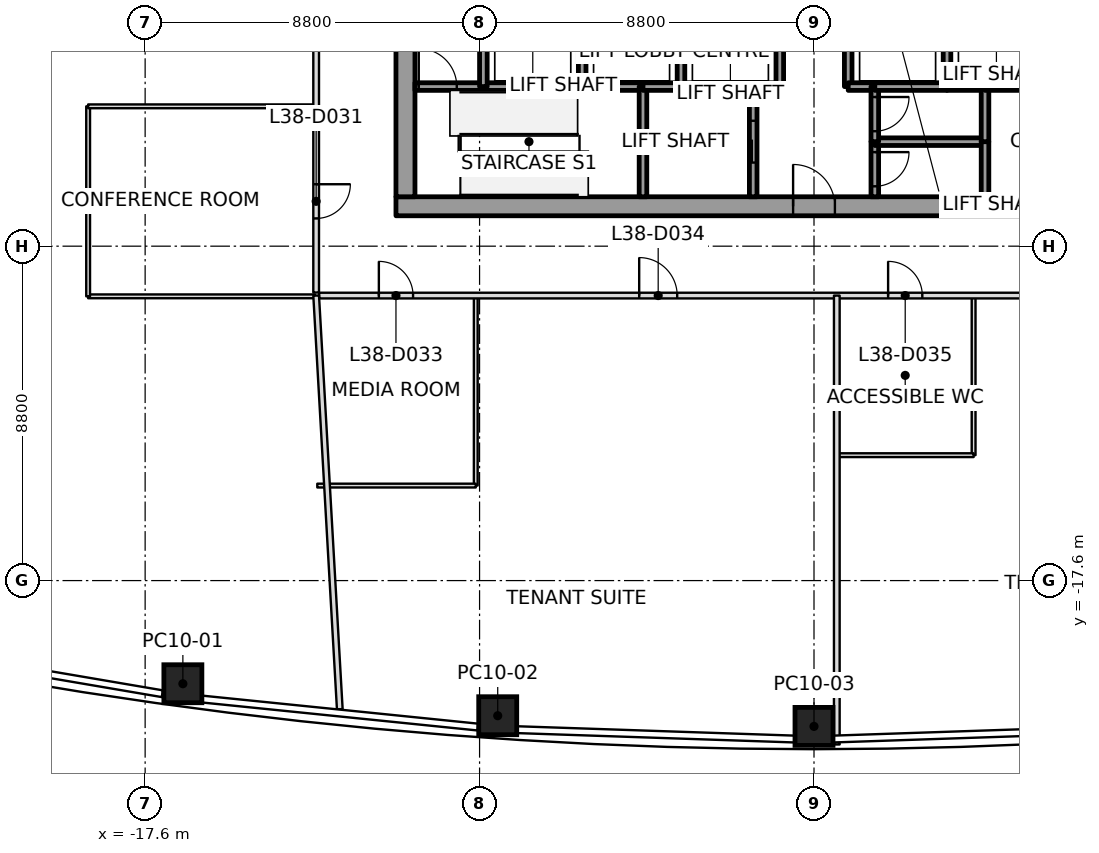
"""IFC4 building model, lengths in metres.
Left out: names, types, materials, properties, quantities, classifications, styles, units other than length and angle.
Written with IfcOpenShell. Run it as: python <this file> out.ifc"""

import sys

from ifc_helpers import new_model, si_unit, direction, frame, frame_2d, origin, origin_2d, place, context, subcontext, project, spatial, rectangle, extrude, element, fill, save


model = new_model("IFC4")
c1 = context("Model", 3, precision=1e-05, world=origin(), true_north=direction((0.0, 1.0)))
c2 = subcontext(c1, "Body", "Model", "MODEL_VIEW")
j1 = project(units=[si_unit("LENGTHUNIT", "METRE"), si_unit("PLANEANGLEUNIT", "RADIAN")], contexts=[c1])
p1 = place(None, origin())
s1 = spatial("IfcSite", under=j1, at=p1, CompositionType="ELEMENT")
p2 = place(p1, origin())
s2 = spatial("IfcBuilding", under=s1, at=p2, CompositionType="ELEMENT")
p3 = place(p2, frame((0.0, 0.0, 173.8)))
s3 = spatial("IfcBuildingStorey", under=s2, at=p3, CompositionType="ELEMENT", Elevation=173.8)
p4 = place(p3, frame((-16.607, -20.315, 0.0), z_axis=(0.017635445209, 0.010495835903, 0.999789392073), x_axis=(-0.990749179491, 0.134751980864, 0.01606135084)))
e1 = element("IfcColumn", 1, at=p4, inside=s3, PredefinedType="COLUMN", context=c2, shape_type="SweptSolid", body=[
    extrude(rectangle(XDim=1.0, YDim=1.0, at=origin_2d()), origin(), (0.0, 0.0, 1.0), 4.001),
])
p5 = place(p3, frame((-8.323, -21.156, 0.0), z_axis=(0.008849193104, 0.011229320904, 0.999897791843), x_axis=(-0.997684103914, 0.067537291309, 0.00807112631)))
e2 = element("IfcColumn", 2, at=p5, inside=s3, PredefinedType="COLUMN", context=c2, shape_type="SweptSolid", body=[
    extrude(rectangle(XDim=1.0, YDim=1.0, at=origin_2d()), origin(), (0.0, 0.0, 1.0), 4.0),
])
p6 = place(p3, frame((0.0, -21.437, 0.0), z_axis=(0.0, 0.01141283087, 0.999934871525), x_axis=(1.0, 0.0, 0.0)))
e3 = element("IfcColumn", 3, at=p6, inside=s3, PredefinedType="COLUMN", context=c2, shape_type="SweptSolid", body=[
    extrude(rectangle(XDim=1.0, YDim=1.0, at=origin_2d()), origin(), (0.0, 0.0, 1.0), 4.0),
])
p7 = place(p3, frame((-11.0, -7.75, 0.0), z_axis=(0.0, 0.0, 1.0), x_axis=(1.0, 0.0, 0.0)))
e4 = element("IfcWall", 4, at=p7, inside=s3, PredefinedType="SHEAR", context=c2, shape_type="SweptSolid", body=[
    extrude(rectangle(XDim=22.0, YDim=0.5, at=frame_2d((11.0, 0.0))), origin(), (0.0, 0.0, 1.0), 4.0),
])
p8 = place(p7, frame((10.45, 0.0, 0.0)))
e5 = element("IfcOpeningElement", 5, at=p8, cuts=e4, PredefinedType="OPENING", context=c2, shape_type="SweptSolid", body=[
    extrude(rectangle(XDim=1.1, YDim=2.1, at=frame_2d((0.55, 1.05))), frame((0.0, 0.25, 0.0), z_axis=(0.0, -1.0, 0.0), x_axis=(1.0, 0.0, 0.0)), (0.0, 0.0, 1.0), 0.5),
])
p9 = place(p3, frame((-10.75, -7.5, 0.0), z_axis=(0.0, 0.0, 1.0), x_axis=(0.0, 1.0, 0.0)))
e6 = element("IfcWall", 6, at=p9, inside=s3, PredefinedType="SHEAR", context=c2, shape_type="SweptSolid", body=[
    extrude(rectangle(XDim=15.0, YDim=0.5, at=frame_2d((7.5, 0.0))), origin(), (0.0, 0.0, 1.0), 4.0),
])
p10 = place(p9, frame((6.6, 0.0, 0.0)))
e7 = element("IfcOpeningElement", 7, at=p10, cuts=e6, PredefinedType="OPENING", context=c2, shape_type="SweptSolid", body=[
    extrude(rectangle(XDim=1.8, YDim=2.1, at=frame_2d((0.9, 1.05))), frame((0.0, 0.25, 0.0), z_axis=(0.0, -1.0, 0.0), x_axis=(1.0, 0.0, 0.0)), (0.0, 0.0, 1.0), 0.5),
])
p11 = place(p3, frame((-10.5, -4.6, 0.0), z_axis=(0.0, 0.0, 1.0), x_axis=(1.0, 0.0, 0.0)))
e8 = element("IfcWall", 8, at=p11, inside=s3, PredefinedType="SOLIDWALL", context=c2, shape_type="SweptSolid", body=[
    extrude(rectangle(XDim=1.8, YDim=0.2, at=frame_2d((0.9, 0.0))), origin(), (0.0, 0.0, 1.0), 3.85),
])
p12 = place(p11, frame((0.1, 0.0, 0.0)))
e9 = element("IfcOpeningElement", 9, at=p12, cuts=e8, PredefinedType="OPENING", context=c2, shape_type="SweptSolid", body=[
    extrude(rectangle(XDim=1.0, YDim=2.1, at=frame_2d((0.5, 1.05))), frame((0.0, 0.1, 0.0), z_axis=(0.0, -1.0, 0.0), x_axis=(1.0, 0.0, 0.0)), (0.0, 0.0, 1.0), 0.2),
])
p13 = place(p3, frame((-8.7, -4.6, 0.0), z_axis=(0.0, 0.0, 1.0), x_axis=(1.0, 0.0, 0.0)))
e10 = element("IfcWall", 10, at=p13, inside=s3, PredefinedType="SOLIDWALL", context=c2, shape_type="SweptSolid", body=[
    extrude(rectangle(XDim=2.6, YDim=0.2, at=frame_2d((1.3, 0.0))), origin(), (0.0, 0.0, 1.0), 3.85),
])
p14 = place(p3, frame((-8.7, -4.6, 0.0), z_axis=(0.0, 0.0, 1.0), x_axis=(0.0, 1.0, 0.0)))
e11 = element("IfcWall", 11, at=p14, inside=s3, PredefinedType="SOLIDWALL", context=c2, shape_type="SweptSolid", body=[
    extrude(rectangle(XDim=2.8, YDim=0.2, at=frame_2d((1.4, 0.0))), origin(), (0.0, 0.0, 1.0), 3.85),
])
p15 = place(p3, frame((-6.1, -4.6, 0.0), z_axis=(0.0, 0.0, 1.0), x_axis=(1.0, 0.0, 0.0)))
e12 = element("IfcWall", 12, at=p15, inside=s3, PredefinedType="SOLIDWALL", context=c2, shape_type="SweptSolid", body=[
    extrude(rectangle(XDim=1.6, YDim=0.2, at=frame_2d((0.8, 0.0))), origin(), (0.0, 0.0, 1.0), 3.85),
])
p16 = place(p3, frame((-6.1, -4.6, 0.0), z_axis=(0.0, 0.0, 1.0), x_axis=(0.0, 1.0, 0.0)))
e13 = element("IfcWall", 13, at=p16, inside=s3, PredefinedType="SOLIDWALL", context=c2, shape_type="SweptSolid", body=[
    extrude(rectangle(XDim=2.8, YDim=0.2, at=frame_2d((1.4, 0.0))), origin(), (0.0, 0.0, 1.0), 3.85),
])
p17 = place(p3, frame((-4.5, -4.6, 0.0), z_axis=(0.0, 0.0, 1.0), x_axis=(0.0, -1.0, 0.0)))
e14 = element("IfcWall", 14, at=p17, inside=s3, PredefinedType="SOLIDWALL", context=c2, shape_type="SweptSolid", body=[
    extrude(rectangle(XDim=2.9, YDim=0.2, at=frame_2d((1.45, 0.0))), origin(), (0.0, 0.0, 1.0), 3.85),
])
p18 = place(p3, frame((-4.5, -4.6, 0.0), z_axis=(0.0, 0.0, 1.0), x_axis=(1.0, 0.0, 0.0)))
e15 = element("IfcWall", 15, at=p18, inside=s3, PredefinedType="SOLIDWALL", context=c2, shape_type="SweptSolid", body=[
    extrude(rectangle(XDim=1.0, YDim=0.2, at=frame_2d((0.5, 0.0))), origin(), (0.0, 0.0, 1.0), 3.85),
])
p19 = place(p3, frame((-3.5, -4.6, 0.0), z_axis=(0.0, 0.0, 1.0), x_axis=(1.0, 0.0, 0.0)))
e16 = element("IfcWall", 16, at=p19, inside=s3, PredefinedType="SOLIDWALL", context=c2, shape_type="SweptSolid", body=[
    extrude(rectangle(XDim=1.9, YDim=0.2, at=frame_2d((0.95, 0.0))), origin(), (0.0, 0.0, 1.0), 3.85),
])
p20 = place(p3, frame((-3.5, -4.6, 0.0), z_axis=(0.0, 0.0, 1.0), x_axis=(0.0, 1.0, 0.0)))
e17 = element("IfcWall", 17, at=p20, inside=s3, PredefinedType="SOLIDWALL", context=c2, shape_type="SweptSolid", body=[
    extrude(rectangle(XDim=2.8, YDim=0.2, at=frame_2d((1.4, 0.0))), origin(), (0.0, 0.0, 1.0), 3.85),
])
p21 = place(p3, frame((-1.6, -7.5, 0.0), z_axis=(0.0, 0.0, 1.0), x_axis=(0.0, 1.0, 0.0)))
e18 = element("IfcWall", 18, at=p21, inside=s3, PredefinedType="SOLIDWALL", context=c2, shape_type="SweptSolid", body=[
    extrude(rectangle(XDim=2.9, YDim=0.2, at=frame_2d((1.45, 0.0))), origin(), (0.0, 0.0, 1.0), 3.85),
])
p22 = place(p21, frame((0.9, 0.0, 0.0)))
e19 = element("IfcOpeningElement", 19, at=p22, cuts=e18, PredefinedType="OPENING", context=c2, shape_type="SweptSolid", body=[
    extrude(rectangle(XDim=1.1, YDim=2.1, at=frame_2d((0.55, 1.05))), frame((0.0, 0.1, 0.0), z_axis=(0.0, -1.0, 0.0), x_axis=(1.0, 0.0, 0.0)), (0.0, 0.0, 1.0), 0.2),
])
p23 = place(p3, frame((-1.6, -4.6, 0.0), z_axis=(0.0, 0.0, 1.0), x_axis=(1.0, 0.0, 0.0)))
e20 = element("IfcWall", 20, at=p23, inside=s3, PredefinedType="SOLIDWALL", context=c2, shape_type="SweptSolid", body=[
    extrude(rectangle(XDim=0.7, YDim=0.2, at=frame_2d((0.35, 0.0))), origin(), (0.0, 0.0, 1.0), 3.85),
])
for number, where, z_axis, x_axis in (
    (21, (-0.9, -4.6, 0.0), (0.0, 0.0, 1.0), (0.0, 1.0, 0.0)),
    (22, (0.9, -1.8, 0.0), (0.0, 0.0, 1.0), (0.0, -1.0, 0.0)),
):
    element("IfcWall", number, at=place(p3, frame(where, z_axis=z_axis, x_axis=x_axis)), inside=s3, PredefinedType="SOLIDWALL", context=c2, shape_type="SweptSolid", body=[
        extrude(rectangle(XDim=2.8, YDim=0.2, at=frame_2d((1.4, 0.0))), origin(), (0.0, 0.0, 1.0), 3.85),
    ])
p24 = place(p3, frame((0.9, -4.6, 0.0), z_axis=(0.0, 0.0, 1.0), x_axis=(1.0, 0.0, 0.0)))
e23 = element("IfcWall", 23, at=p24, inside=s3, PredefinedType="SOLIDWALL", context=c2, shape_type="SweptSolid", body=[
    extrude(rectangle(XDim=0.7, YDim=0.2, at=frame_2d((0.35, 0.0))), origin(), (0.0, 0.0, 1.0), 3.85),
])
p25 = place(p3, frame((1.6, -6.05, 0.0), z_axis=(0.0, 0.0, 1.0), x_axis=(0.0, -1.0, 0.0)))
e24 = element("IfcWall", 24, at=p25, inside=s3, PredefinedType="SOLIDWALL", context=c2, shape_type="SweptSolid", body=[
    extrude(rectangle(XDim=1.45, YDim=0.2, at=frame_2d((0.725, 0.0))), origin(), (0.0, 0.0, 1.0), 3.85),
])
p26 = place(p25, frame((0.275, 0.0, 0.0)))
e25 = element("IfcOpeningElement", 25, at=p26, cuts=e24, PredefinedType="OPENING", context=c2, shape_type="SweptSolid", body=[
    extrude(rectangle(XDim=0.9, YDim=2.1, at=frame_2d((0.45, 1.05))), frame((0.0, 0.1, 0.0), z_axis=(0.0, -1.0, 0.0), x_axis=(1.0, 0.0, 0.0)), (0.0, 0.0, 1.0), 0.2),
])
p27 = place(p3, frame((4.5, -6.05, 0.0), z_axis=(0.0, 0.0, 1.0), x_axis=(-1.0, 0.0, 0.0)))
e26 = element("IfcWall", 26, at=p27, inside=s3, PredefinedType="SOLIDWALL", context=c2, shape_type="SweptSolid", body=[
    extrude(rectangle(XDim=2.9, YDim=0.2, at=frame_2d((1.45, 0.0))), origin(), (0.0, 0.0, 1.0), 3.85),
])
p28 = place(p3, frame((1.6, -4.6, 0.0), z_axis=(0.0, 0.0, 1.0), x_axis=(0.0, -1.0, 0.0)))
e27 = element("IfcWall", 27, at=p28, inside=s3, PredefinedType="SOLIDWALL", context=c2, shape_type="SweptSolid", body=[
    extrude(rectangle(XDim=1.45, YDim=0.2, at=frame_2d((0.725, 0.0))), origin(), (0.0, 0.0, 1.0), 3.85),
])
p29 = place(p28, frame((0.275, 0.0, 0.0)))
e28 = element("IfcOpeningElement", 28, at=p29, cuts=e27, PredefinedType="OPENING", context=c2, shape_type="SweptSolid", body=[
    extrude(rectangle(XDim=0.9, YDim=2.1, at=frame_2d((0.45, 1.05))), frame((0.0, 0.1, 0.0), z_axis=(0.0, -1.0, 0.0), x_axis=(1.0, 0.0, 0.0)), (0.0, 0.0, 1.0), 0.2),
])
p30 = place(p3, frame((3.5, -4.6, 0.0), z_axis=(0.0, 0.0, 1.0), x_axis=(-1.0, 0.0, 0.0)))
e29 = element("IfcWall", 29, at=p30, inside=s3, PredefinedType="SOLIDWALL", context=c2, shape_type="SweptSolid", body=[
    extrude(rectangle(XDim=1.9, YDim=0.2, at=frame_2d((0.95, 0.0))), origin(), (0.0, 0.0, 1.0), 3.85),
])
p31 = place(p3, frame((4.5, -4.6, 0.0), z_axis=(0.0, 0.0, 1.0), x_axis=(-1.0, 0.0, 0.0)))
e30 = element("IfcWall", 30, at=p31, inside=s3, PredefinedType="SOLIDWALL", context=c2, shape_type="SweptSolid", body=[
    extrude(rectangle(XDim=1.0, YDim=0.2, at=frame_2d((0.5, 0.0))), origin(), (0.0, 0.0, 1.0), 3.85),
])
p32 = place(p3, frame((3.5, -4.6, 0.0), z_axis=(0.0, 0.0, 1.0), x_axis=(0.0, 1.0, 0.0)))
e31 = element("IfcWall", 31, at=p32, inside=s3, PredefinedType="SOLIDWALL", context=c2, shape_type="SweptSolid", body=[
    extrude(rectangle(XDim=2.8, YDim=0.2, at=frame_2d((1.4, 0.0))), origin(), (0.0, 0.0, 1.0), 3.85),
])
for number, where, z_axis, x_axis in (
    (32, (4.5, -6.05, 0.0), (0.0, 0.0, 1.0), (0.0, -1.0, 0.0)),
    (33, (4.5, -4.6, 0.0), (0.0, 0.0, 1.0), (0.0, -1.0, 0.0)),
):
    element("IfcWall", number, at=place(p3, frame(where, z_axis=z_axis, x_axis=x_axis)), inside=s3, PredefinedType="SOLIDWALL", context=c2, shape_type="SweptSolid", body=[
        extrude(rectangle(XDim=1.45, YDim=0.2, at=frame_2d((0.725, 0.0))), origin(), (0.0, 0.0, 1.0), 3.85),
    ])
p33 = place(p3, frame((6.1, -4.6, 0.0), z_axis=(0.0, 0.0, 1.0), x_axis=(-1.0, 0.0, 0.0)))
e34 = element("IfcWall", 34, at=p33, inside=s3, PredefinedType="SOLIDWALL", context=c2, shape_type="SweptSolid", body=[
    extrude(rectangle(XDim=1.6, YDim=0.2, at=frame_2d((0.8, 0.0))), origin(), (0.0, 0.0, 1.0), 3.85),
])
p34 = place(p3, frame((-13.1, -10.1, 0.0), z_axis=(0.0, 0.0, 1.0), x_axis=(0.057075935192, -0.9983698401, 0.0)))
e35 = element("IfcWall", 35, at=p34, inside=s3, PredefinedType="PARTITIONING", context=c2, shape_type="SweptSolid", body=[
    extrude(rectangle(XDim=10.903, YDim=0.15, at=frame_2d((5.452, 0.0))), origin(), (0.0, 0.0, 1.0), 3.234),
])
p35 = place(p3, frame((0.6, -10.1, 0.0), z_axis=(0.0, 0.0, 1.0), x_axis=(0.0, -1.0, 0.0)))
e36 = element("IfcWall", 36, at=p35, inside=s3, PredefinedType="PARTITIONING", context=c2, shape_type="SweptSolid", body=[
    extrude(rectangle(XDim=11.812, YDim=0.15, at=frame_2d((5.906, 0.0))), origin(), (0.0, 0.0, 1.0), 3.234),
])
p36 = place(p3, frame((-13.1, 8.866, 0.0), z_axis=(0.0, 0.0, 1.0), x_axis=(0.0, -1.0, 0.0)))
e37 = element("IfcWall", 37, at=p36, inside=s3, PredefinedType="PARTITIONING", context=c2, shape_type="SweptSolid", body=[
    extrude(rectangle(XDim=18.886, YDim=0.15, at=frame_2d((9.443, 0.0))), origin(), (0.0, 0.0, 1.0), 3.166),
])
p37 = place(p36, frame((16.037, 0.0, 0.0)))
e38 = element("IfcOpeningElement", 38, at=p37, cuts=e37, PredefinedType="OPENING", context=c2, shape_type="SweptSolid", body=[
    extrude(rectangle(XDim=0.9, YDim=2.1, at=frame_2d((0.45, 1.05))), frame((0.0, 0.075, 0.0), z_axis=(0.0, -1.0, 0.0), x_axis=(1.0, 0.0, 0.0)), (0.0, 0.0, 1.0), 0.15),
])
p38 = place(p36, frame((6.443, 0.0, 0.0)))
e39 = element("IfcOpeningElement", 39, at=p38, cuts=e37, PredefinedType="OPENING", context=c2, shape_type="SweptSolid", body=[
    extrude(rectangle(XDim=1.0, YDim=2.1, at=frame_2d((0.5, 1.05))), frame((0.0, 0.075, 0.0), z_axis=(0.0, -1.0, 0.0), x_axis=(1.0, 0.0, 0.0)), (0.0, 0.0, 1.0), 0.15),
])
p39 = place(p3, frame((-13.02, -10.1, 0.0), z_axis=(0.0, 0.0, 1.0), x_axis=(1.0, 0.0, 0.0)))
e40 = element("IfcWall", 40, at=p39, inside=s3, PredefinedType="PARTITIONING", context=c2, shape_type="SweptSolid", body=[
    extrude(rectangle(XDim=26.04, YDim=0.15, at=frame_2d((13.02, 0.0))), origin(), (0.0, 0.0, 1.0), 3.317),
])
p40 = place(p39, frame((1.57, 0.0, 0.0)))
e41 = element("IfcOpeningElement", 41, at=p40, cuts=e40, PredefinedType="OPENING", context=c2, shape_type="SweptSolid", body=[
    extrude(rectangle(XDim=0.9, YDim=2.1, at=frame_2d((0.45, 1.05))), frame((0.0, 0.075, 0.0), z_axis=(0.0, -1.0, 0.0), x_axis=(1.0, 0.0, 0.0)), (0.0, 0.0, 1.0), 0.15),
])
p41 = place(p39, frame((8.42, 0.0, 0.0)))
e42 = element("IfcOpeningElement", 42, at=p41, cuts=e40, PredefinedType="OPENING", context=c2, shape_type="SweptSolid", body=[
    extrude(rectangle(XDim=1.0, YDim=2.1, at=frame_2d((0.5, 1.05))), frame((0.0, 0.075, 0.0), z_axis=(0.0, -1.0, 0.0), x_axis=(1.0, 0.0, 0.0)), (0.0, 0.0, 1.0), 0.15),
])
p42 = place(p39, frame((14.97, 0.0, 0.0)))
e43 = element("IfcOpeningElement", 43, at=p42, cuts=e40, PredefinedType="OPENING", context=c2, shape_type="SweptSolid", body=[
    extrude(rectangle(XDim=0.9, YDim=2.1, at=frame_2d((0.45, 1.05))), frame((0.0, 0.075, 0.0), z_axis=(0.0, -1.0, 0.0), x_axis=(1.0, 0.0, 0.0)), (0.0, 0.0, 1.0), 0.15),
])
p43 = place(p39, frame((21.22, 0.0, 0.0)))
e44 = element("IfcOpeningElement", 44, at=p43, cuts=e40, PredefinedType="OPENING", context=c2, shape_type="SweptSolid", body=[
    extrude(rectangle(XDim=1.0, YDim=2.1, at=frame_2d((0.5, 1.05))), frame((0.0, 0.075, 0.0), z_axis=(0.0, -1.0, 0.0), x_axis=(1.0, 0.0, 0.0)), (0.0, 0.0, 1.0), 0.15),
])
p44 = place(p3, frame((-13.13, -10.12, 0.0), z_axis=(0.0, 0.0, 1.0), x_axis=(-1.0, 0.0, 0.0)))
e45 = element("IfcWall", 45, at=p44, inside=s3, PredefinedType="PARTITIONING", context=c2, shape_type="SweptSolid", body=[
    extrude(rectangle(XDim=5.97, YDim=0.1, at=frame_2d((2.985, 0.0))), origin(), (0.0, 0.0, 1.0), 3.166),
])
p45 = place(p3, frame((-19.1, -10.12, 0.0), z_axis=(0.0, 0.0, 1.0), x_axis=(0.0, 1.0, 0.0)))
e46 = element("IfcWall", 46, at=p45, inside=s3, PredefinedType="PARTITIONING", context=c2, shape_type="SweptSolid", body=[
    extrude(rectangle(XDim=5.0, YDim=0.1, at=frame_2d((2.5, 0.0))), origin(), (0.0, 0.0, 1.0), 3.45),
])
p46 = place(p3, frame((-19.1, -5.12, 0.0), z_axis=(0.0, 0.0, 1.0), x_axis=(1.0, 0.0, 0.0)))
e47 = element("IfcWall", 47, at=p46, inside=s3, PredefinedType="PARTITIONING", context=c2, shape_type="SweptSolid", body=[
    extrude(rectangle(XDim=5.97, YDim=0.1, at=frame_2d((2.985, 0.0))), origin(), (0.0, 0.0, 1.0), 3.247),
])
p47 = place(p3, frame((-8.9, -10.13, 0.0), z_axis=(0.0, 0.0, 1.0), x_axis=(0.0, -1.0, 0.0)))
e48 = element("IfcWall", 48, at=p47, inside=s3, PredefinedType="PARTITIONING", context=c2, shape_type="SweptSolid", body=[
    extrude(rectangle(XDim=4.97, YDim=0.1, at=frame_2d((2.485, 0.0))), origin(), (0.0, 0.0, 1.0), 3.45),
])
p48 = place(p3, frame((-8.9, -15.1, 0.0), z_axis=(0.0, 0.0, 1.0), x_axis=(-1.0, 0.0, 0.0)))
e49 = element("IfcWall", 49, at=p48, inside=s3, PredefinedType="PARTITIONING", context=c2, shape_type="SweptSolid", body=[
    extrude(rectangle(XDim=4.17, YDim=0.1, at=frame_2d((2.085, 0.0))), origin(), (0.0, 0.0, 1.0), 3.317),
])
p49 = place(p3, frame((4.2, -10.13, 0.0), z_axis=(0.0, 0.0, 1.0), x_axis=(0.0, -1.0, 0.0)))
e50 = element("IfcWall", 50, at=p49, inside=s3, PredefinedType="PARTITIONING", context=c2, shape_type="SweptSolid", body=[
    extrude(rectangle(XDim=4.17, YDim=0.1, at=frame_2d((2.085, 0.0))), origin(), (0.0, 0.0, 1.0), 3.45),
])
p50 = place(p3, frame((4.2, -14.3, 0.0), z_axis=(0.0, 0.0, 1.0), x_axis=(-1.0, 0.0, 0.0)))
e51 = element("IfcWall", 51, at=p50, inside=s3, PredefinedType="PARTITIONING", context=c2, shape_type="SweptSolid", body=[
    extrude(rectangle(XDim=3.57, YDim=0.1, at=frame_2d((1.785, 0.0))), origin(), (0.0, 0.0, 1.0), 3.317),
])
p51 = place(p37, origin())
e52 = element("IfcDoor", 52, at=p51, inside=s3, OperationType="SINGLE_SWING_LEFT", PredefinedType="DOOR", context=c2, shape_type="SweptSolid", body=[
    extrude(rectangle(XDim=0.9, YDim=2.1, at=frame_2d((0.45, 1.05))), frame((0.0, 0.025, 0.0), z_axis=(0.0, -1.0, 0.0), x_axis=(1.0, 0.0, 0.0)), (0.0, 0.0, 1.0), 0.05),
])
fill(e38, e52)
p52 = place(p40, origin())
e53 = element("IfcDoor", 53, at=p52, inside=s3, OperationType="SINGLE_SWING_RIGHT", PredefinedType="DOOR", context=c2, shape_type="SweptSolid", body=[
    extrude(rectangle(XDim=0.9, YDim=2.1, at=frame_2d((0.45, 1.05))), frame((0.0, 0.025, 0.0), z_axis=(0.0, -1.0, 0.0), x_axis=(1.0, 0.0, 0.0)), (0.0, 0.0, 1.0), 0.05),
])
fill(e41, e53)
p53 = place(p41, origin())
e54 = element("IfcDoor", 54, at=p53, inside=s3, OperationType="SINGLE_SWING_LEFT", PredefinedType="DOOR", context=c2, shape_type="SweptSolid", body=[
    extrude(rectangle(XDim=1.0, YDim=2.1, at=frame_2d((0.5, 1.05))), frame((0.0, 0.025, 0.0), z_axis=(0.0, -1.0, 0.0), x_axis=(1.0, 0.0, 0.0)), (0.0, 0.0, 1.0), 0.05),
])
fill(e42, e54)
p54 = place(p42, origin())
e55 = element("IfcDoor", 55, at=p54, inside=s3, OperationType="SINGLE_SWING_LEFT", PredefinedType="DOOR", context=c2, shape_type="SweptSolid", body=[
    extrude(rectangle(XDim=0.9, YDim=2.1, at=frame_2d((0.45, 1.05))), frame((0.0, 0.025, 0.0), z_axis=(0.0, -1.0, 0.0), x_axis=(1.0, 0.0, 0.0)), (0.0, 0.0, 1.0), 0.05),
])
fill(e43, e55)
p55 = place(p22, origin())
e56 = element("IfcDoor", 56, at=p55, inside=s3, OperationType="SLIDING_TO_LEFT", PredefinedType="DOOR", context=c2, shape_type="SweptSolid", body=[
    extrude(rectangle(XDim=1.1, YDim=2.1, at=frame_2d((0.55, 1.05))), frame((0.0, 0.025, 0.0), z_axis=(0.0, -1.0, 0.0), x_axis=(1.0, 0.0, 0.0)), (0.0, 0.0, 1.0), 0.05),
])
fill(e19, e56)
p56 = place(p12, origin())
e57 = element("IfcDoor", 57, at=p56, inside=s3, OperationType="SINGLE_SWING_LEFT", PredefinedType="DOOR", context=c2, shape_type="SweptSolid", body=[
    extrude(rectangle(XDim=1.0, YDim=2.1, at=frame_2d((0.5, 1.05))), frame((0.0, 0.025, 0.0), z_axis=(0.0, -1.0, 0.0), x_axis=(1.0, 0.0, 0.0)), (0.0, 0.0, 1.0), 0.05),
])
fill(e9, e57)
p57 = place(p26, origin())
e58 = element("IfcDoor", 58, at=p57, inside=s3, OperationType="SINGLE_SWING_LEFT", PredefinedType="DOOR", context=c2, shape_type="SweptSolid", body=[
    extrude(rectangle(XDim=0.9, YDim=2.1, at=frame_2d((0.45, 1.05))), frame((0.0, 0.025, 0.0), z_axis=(0.0, -1.0, 0.0), x_axis=(1.0, 0.0, 0.0)), (0.0, 0.0, 1.0), 0.05),
])
fill(e25, e58)
p58 = place(p29, origin())
e59 = element("IfcDoor", 59, at=p58, inside=s3, OperationType="SINGLE_SWING_LEFT", PredefinedType="DOOR", context=c2, shape_type="SweptSolid", body=[
    extrude(rectangle(XDim=0.9, YDim=2.1, at=frame_2d((0.45, 1.05))), frame((0.0, 0.025, 0.0), z_axis=(0.0, -1.0, 0.0), x_axis=(1.0, 0.0, 0.0)), (0.0, 0.0, 1.0), 0.05),
])
fill(e28, e59)
p59 = place(p8, origin())
e60 = element("IfcDoor", 60, at=p59, inside=s3, OperationType="SINGLE_SWING_RIGHT", PredefinedType="DOOR", context=c2, shape_type="SweptSolid", body=[
    extrude(rectangle(XDim=1.1, YDim=2.1, at=frame_2d((0.55, 1.05))), frame((0.0, 0.025, 0.0), z_axis=(0.0, -1.0, 0.0), x_axis=(1.0, 0.0, 0.0)), (0.0, 0.0, 1.0), 0.05),
])
fill(e5, e60)
save(model, sys.argv[1])
